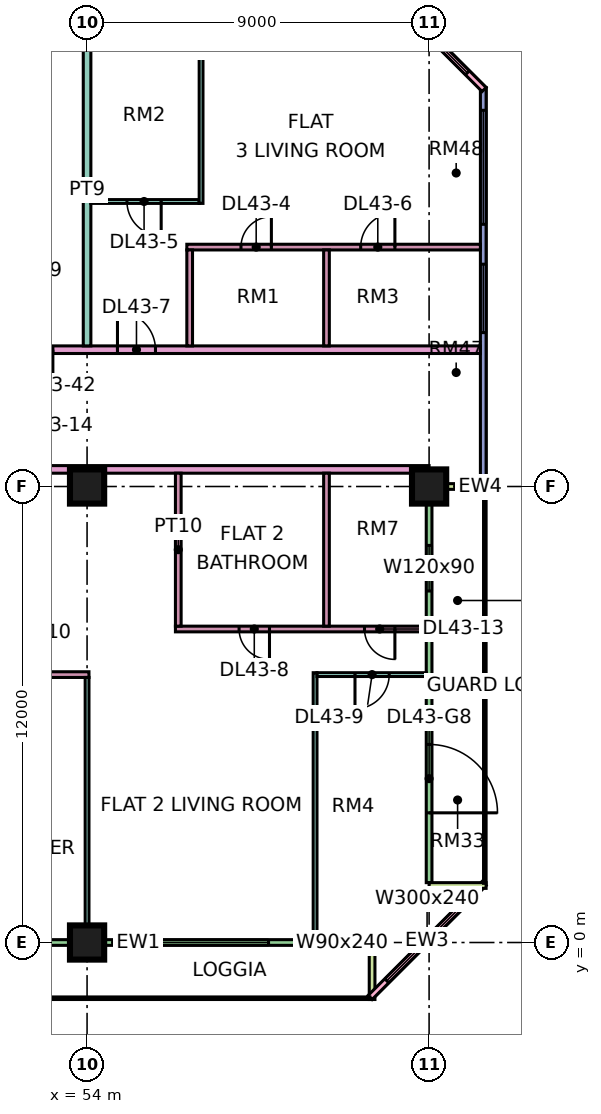
"""IFC4 building model, lengths in metres.
Left out: names, types, materials, properties, quantities, classifications, styles, units other than length and angle.
Written with IfcOpenShell. Run it as: python <this file> out.ifc"""

import sys

from ifc_helpers import new_model, si_unit, direction, frame, frame_2d, origin, origin_2d, place, context, subcontext, project, spatial, rectangle, extrude, element, fill, save


model = new_model("IFC4")
c1 = context("Model", 3, precision=1e-05, world=origin(), true_north=direction((0.0, 1.0)))
c2 = subcontext(c1, "Body", "Model", "MODEL_VIEW")
j1 = project(units=[si_unit("LENGTHUNIT", "METRE"), si_unit("PLANEANGLEUNIT", "RADIAN")], contexts=[c1])
p1 = place(None, origin())
s1 = spatial("IfcSite", under=j1, at=p1, CompositionType="ELEMENT")
p2 = place(p1, origin())
s2 = spatial("IfcBuilding", under=s1, at=p2, CompositionType="ELEMENT")
p3 = place(p2, frame((0.0, 0.0, 187.4)))
s3 = spatial("IfcBuildingStorey", under=s2, at=p3, CompositionType="ELEMENT", Elevation=187.4)
for number, where, z_axis, x_axis in (
    (1, (54.0, 0.0, 0.0), (0.0, 0.0, 1.0), (1.0, 0.0, 0.0)),
    (2, (54.0, 12.0, 0.0), (0.0, 0.0, 1.0), (1.0, 0.0, 0.0)),
    (3, (63.0, 12.0, 0.0), (0.0, 0.0, 1.0), (1.0, 0.0, 0.0)),
):
    element("IfcColumn", number, at=place(p3, frame(where, z_axis=z_axis, x_axis=x_axis)), inside=s3, PredefinedType="COLUMN", context=c2, shape_type="SweptSolid", body=[
        extrude(rectangle(XDim=0.9, YDim=0.9, at=origin_2d()), origin(), (0.0, 0.0, 1.0), 3.75),
    ])
p4 = place(p3, frame((48.075, 0.0, 0.0), z_axis=(0.0, 0.0, 1.0), x_axis=(1.0, 0.0, 0.0)))
e4 = element("IfcWall", 4, at=p4, inside=s3, PredefinedType="SOLIDWALL", context=c2, shape_type="SweptSolid", body=[
    extrude(rectangle(XDim=13.35, YDim=0.15, at=frame_2d((6.675, 0.0))), origin(), (0.0, 0.0, 1.0), 3.35),
])
p5 = place(p4, frame((1.788, 0.0, 0.0)))
e5 = element("IfcOpeningElement", 5, at=p5, cuts=e4, PredefinedType="OPENING", context=c2, shape_type="SweptSolid", body=[
    extrude(rectangle(XDim=1.8, YDim=2.4, at=frame_2d((0.9, 1.2))), frame((0.0, 0.085, 0.0), z_axis=(0.0, -1.0, 0.0), x_axis=(1.0, 0.0, 0.0)), (0.0, 0.0, 1.0), 0.17),
])
p6 = place(p4, frame((7.7, 0.0, 0.45)))
e6 = element("IfcOpeningElement", 6, at=p6, cuts=e4, PredefinedType="OPENING", context=c2, shape_type="SweptSolid", body=[
    extrude(rectangle(XDim=3.0, YDim=2.4, at=frame_2d((1.5, 1.2))), frame((0.0, 0.085, 0.0), z_axis=(0.0, -1.0, 0.0), x_axis=(1.0, 0.0, 0.0)), (0.0, 0.0, 1.0), 0.17),
])
p7 = place(p4, frame((12.188, 0.0, 0.45)))
e7 = element("IfcOpeningElement", 7, at=p7, cuts=e4, PredefinedType="OPENING", context=c2, shape_type="SweptSolid", body=[
    extrude(rectangle(XDim=0.9, YDim=2.4, at=frame_2d((0.45, 1.2))), frame((0.0, 0.085, 0.0), z_axis=(0.0, -1.0, 0.0), x_axis=(1.0, 0.0, 0.0)), (0.0, 0.0, 1.0), 0.17),
])
p8 = place(p3, frame((61.5, -1.5, 0.0), z_axis=(0.0, 0.0, 1.0), x_axis=(0.0, 1.0, 0.0)))
e8 = element("IfcWall", 8, at=p8, inside=s3, PredefinedType="SOLIDWALL", context=c2, shape_type="SweptSolid", body=[
    extrude(rectangle(XDim=1.5, YDim=0.15, at=frame_2d((0.75, 0.0))), origin(), (0.0, 0.0, 1.0), 3.35),
])
p9 = place(p3, frame((61.447, -1.447, 0.0), z_axis=(0.0, 0.0, 1.0), x_axis=(0.707106781187, 0.707106781187, 0.0)))
e9 = element("IfcWall", 9, at=p9, inside=s3, PredefinedType="SOLIDWALL", context=c2, shape_type="SweptSolid", body=[
    extrude(rectangle(XDim=4.243, YDim=0.15, at=frame_2d((2.121, 0.0))), origin(), (0.0, 0.0, 1.0), 3.35),
])
p10 = place(p9, frame((0.621, 0.0, 0.45)))
e10 = element("IfcOpeningElement", 10, at=p10, cuts=e9, PredefinedType="OPENING", context=c2, shape_type="SweptSolid", body=[
    extrude(rectangle(XDim=3.0, YDim=2.4, at=frame_2d((1.5, 1.2))), frame((0.0, 0.085, 0.0), z_axis=(0.0, -1.0, 0.0), x_axis=(1.0, 0.0, 0.0)), (0.0, 0.0, 1.0), 0.17),
])
p11 = place(p3, frame((63.0, 1.575, 0.0), z_axis=(0.0, 0.0, 1.0), x_axis=(0.0, 1.0, 0.0)))
e11 = element("IfcWall", 11, at=p11, inside=s3, PredefinedType="SOLIDWALL", context=c2, shape_type="SweptSolid", body=[
    extrude(rectangle(XDim=10.35, YDim=0.15, at=frame_2d((5.175, 0.0))), origin(), (0.0, 0.0, 1.0), 3.35),
])
p12 = place(p11, frame((1.837, 0.0, 0.0)))
e12 = element("IfcOpeningElement", 12, at=p12, cuts=e11, PredefinedType="OPENING", context=c2, shape_type="SweptSolid", body=[
    extrude(rectangle(XDim=1.8, YDim=2.4, at=frame_2d((0.9, 1.2))), frame((0.0, 0.085, 0.0), z_axis=(0.0, -1.0, 0.0), x_axis=(1.0, 0.0, 0.0)), (0.0, 0.0, 1.0), 0.17),
])
p13 = place(p11, frame((7.675, 0.0, 1.7)))
e13 = element("IfcOpeningElement", 13, at=p13, cuts=e11, PredefinedType="OPENING", context=c2, shape_type="SweptSolid", body=[
    extrude(rectangle(XDim=1.2, YDim=0.9, at=frame_2d((0.6, 0.45))), frame((0.0, 0.085, 0.0), z_axis=(0.0, -1.0, 0.0), x_axis=(1.0, 0.0, 0.0)), (0.0, 0.0, 1.0), 0.17),
])
for number, where, z_axis, x_axis in (
    (14, (64.5, 1.5, 0.0), (0.0, 0.0, 1.0), (-1.0, 0.0, 0.0)),
    (15, (64.5, 12.0, 0.0), (0.0, 0.0, 1.0), (-1.0, 0.0, 0.0)),
):
    element("IfcWall", number, at=place(p3, frame(where, z_axis=z_axis, x_axis=x_axis)), inside=s3, PredefinedType="SOLIDWALL", context=c2, shape_type="SweptSolid", body=[
        extrude(rectangle(XDim=1.5, YDim=0.15, at=frame_2d((0.75, 0.0))), origin(), (0.0, 0.0, 1.0), 3.35),
    ])
p14 = place(p3, frame((64.425, 12.075, 0.0), z_axis=(0.0, 0.0, 1.0), x_axis=(0.0, 1.0, 0.0)))
e16 = element("IfcWall", 16, at=p14, inside=s3, PredefinedType="SOLIDWALL", context=c2, shape_type="SweptSolid", body=[
    extrude(rectangle(XDim=10.425, YDim=0.15, at=frame_2d((5.212, 0.0))), origin(), (0.0, 0.0, 1.0), 3.35),
])
p15 = place(p14, frame((3.975, 0.0, 0.45)))
e17 = element("IfcOpeningElement", 17, at=p15, cuts=e16, PredefinedType="OPENING", context=c2, shape_type="SweptSolid", body=[
    extrude(rectangle(XDim=1.8, YDim=2.4, at=frame_2d((0.9, 1.2))), frame((0.0, 0.085, 0.0), z_axis=(0.0, -1.0, 0.0), x_axis=(1.0, 0.0, 0.0)), (0.0, 0.0, 1.0), 0.17),
])
p16 = place(p14, frame((6.825, 0.0, 0.45)))
e18 = element("IfcOpeningElement", 18, at=p16, cuts=e16, PredefinedType="OPENING", context=c2, shape_type="SweptSolid", body=[
    extrude(rectangle(XDim=3.0, YDim=2.4, at=frame_2d((1.5, 1.2))), frame((0.0, 0.085, 0.0), z_axis=(0.0, -1.0, 0.0), x_axis=(1.0, 0.0, 0.0)), (0.0, 0.0, 1.0), 0.17),
])
p17 = place(p3, frame((64.447, 22.447, 0.0), z_axis=(0.0, 0.0, 1.0), x_axis=(-0.707106781187, 0.707106781187, 0.0)))
e19 = element("IfcWall", 19, at=p17, inside=s3, PredefinedType="SOLIDWALL", context=c2, shape_type="SweptSolid", body=[
    extrude(rectangle(XDim=4.243, YDim=0.15, at=frame_2d((2.121, 0.0))), origin(), (0.0, 0.0, 1.0), 3.35),
])
p18 = place(p17, frame((0.621, 0.0, 0.45)))
e20 = element("IfcOpeningElement", 20, at=p18, cuts=e19, PredefinedType="OPENING", context=c2, shape_type="SweptSolid", body=[
    extrude(rectangle(XDim=3.0, YDim=2.4, at=frame_2d((1.5, 1.2))), frame((0.0, 0.085, 0.0), z_axis=(0.0, -1.0, 0.0), x_axis=(1.0, 0.0, 0.0)), (0.0, 0.0, 1.0), 0.17),
])
p19 = place(p3, frame((40.65, 12.45, 0.0), z_axis=(0.0, 0.0, 1.0), x_axis=(1.0, 0.0, 0.0)))
e21 = element("IfcWall", 21, at=p19, inside=s3, PredefinedType="PARTITIONING", context=c2, shape_type="SweptSolid", body=[
    extrude(rectangle(XDim=22.35, YDim=0.2, at=frame_2d((11.175, 0.0))), origin(), (0.0, 0.0, 1.0), 3.35),
])
p20 = place(p19, frame((10.8, 0.0, 0.0)))
e22 = element("IfcOpeningElement", 22, at=p20, cuts=e21, PredefinedType="OPENING", context=c2, shape_type="SweptSolid", body=[
    extrude(rectangle(XDim=1.0, YDim=2.1, at=frame_2d((0.5, 1.05))), frame((0.0, 0.11, 0.0), z_axis=(0.0, -1.0, 0.0), x_axis=(1.0, 0.0, 0.0)), (0.0, 0.0, 1.0), 0.22),
])
p21 = place(p19, frame((1.05, 0.0, 0.0)))
e23 = element("IfcOpeningElement", 23, at=p21, cuts=e21, PredefinedType="OPENING", context=c2, shape_type="SweptSolid", body=[
    extrude(rectangle(XDim=1.0, YDim=2.1, at=frame_2d((0.5, 1.05))), frame((0.0, 0.11, 0.0), z_axis=(0.0, -1.0, 0.0), x_axis=(1.0, 0.0, 0.0)), (0.0, 0.0, 1.0), 0.22),
])
p22 = place(p3, frame((48.1, 7.05, 0.0), z_axis=(0.0, 0.0, 1.0), x_axis=(1.0, 0.0, 0.0)))
e24 = element("IfcWall", 24, at=p22, inside=s3, PredefinedType="PARTITIONING", context=c2, shape_type="SweptSolid", body=[
    extrude(rectangle(XDim=5.95, YDim=0.15, at=frame_2d((2.975, 0.0))), origin(), (0.0, 0.0, 1.0), 3.35),
])
p23 = place(p22, frame((3.95, 0.0, 0.0)))
e25 = element("IfcOpeningElement", 25, at=p23, cuts=e24, PredefinedType="OPENING", context=c2, shape_type="SweptSolid", body=[
    extrude(rectangle(XDim=0.9, YDim=2.1, at=frame_2d((0.45, 1.05))), frame((0.0, 0.085, 0.0), z_axis=(0.0, -1.0, 0.0), x_axis=(1.0, 0.0, 0.0)), (0.0, 0.0, 1.0), 0.17),
])
p24 = place(p3, frame((51.225, 15.6, 0.0), z_axis=(0.0, 0.0, 1.0), x_axis=(1.0, 0.0, 0.0)))
e26 = element("IfcWall", 26, at=p24, inside=s3, PredefinedType="PARTITIONING", context=c2, shape_type="SweptSolid", body=[
    extrude(rectangle(XDim=13.125, YDim=0.2, at=frame_2d((6.562, 0.0))), origin(), (0.0, 0.0, 1.0), 3.35),
])
p25 = place(p24, frame((3.575, 0.0, 0.0)))
e27 = element("IfcOpeningElement", 27, at=p25, cuts=e26, PredefinedType="OPENING", context=c2, shape_type="SweptSolid", body=[
    extrude(rectangle(XDim=1.0, YDim=2.1, at=frame_2d((0.5, 1.05))), frame((0.0, 0.11, 0.0), z_axis=(0.0, -1.0, 0.0), x_axis=(1.0, 0.0, 0.0)), (0.0, 0.0, 1.0), 0.22),
])
p26 = place(p24, frame((0.875, 0.0, 0.0)))
e28 = element("IfcOpeningElement", 28, at=p26, cuts=e26, PredefinedType="OPENING", context=c2, shape_type="SweptSolid", body=[
    extrude(rectangle(XDim=1.0, YDim=2.1, at=frame_2d((0.5, 1.05))), frame((0.0, 0.11, 0.0), z_axis=(0.0, -1.0, 0.0), x_axis=(1.0, 0.0, 0.0)), (0.0, 0.0, 1.0), 0.22),
])
p27 = place(p3, frame((54.0, 0.074, 0.0), z_axis=(0.0, 0.0, 1.0), x_axis=(0.0, 1.0, 0.0)))
e29 = element("IfcWall", 29, at=p27, inside=s3, PredefinedType="PARTITIONING", context=c2, shape_type="SweptSolid", body=[
    extrude(rectangle(XDim=6.901, YDim=0.1, at=frame_2d((3.451, 0.0))), origin(), (0.0, 0.0, 1.0), 3.35),
])
p28 = place(p3, frame((54.0, 15.7, 0.0), z_axis=(0.0, 0.0, 1.0), x_axis=(0.0, 1.0, 0.0)))
e30 = element("IfcWall", 30, at=p28, inside=s3, PredefinedType="PARTITIONING", context=c2, shape_type="SweptSolid", body=[
    extrude(rectangle(XDim=8.226, YDim=0.2, at=frame_2d((4.113, 0.0))), origin(), (0.0, 0.0, 1.0), 3.35),
])
p29 = place(p3, frame((54.1, 19.5, 0.0), z_axis=(0.0, 0.0, 1.0), x_axis=(1.0, 0.0, 0.0)))
e31 = element("IfcWall", 31, at=p29, inside=s3, PredefinedType="PARTITIONING", context=c2, shape_type="SweptSolid", body=[
    extrude(rectangle(XDim=2.85, YDim=0.1, at=frame_2d((1.425, 0.0))), origin(), (0.0, 0.0, 1.0), 3.35),
])
p30 = place(p29, frame((0.95, 0.0, 0.0)))
e32 = element("IfcOpeningElement", 32, at=p30, cuts=e31, PredefinedType="OPENING", context=c2, shape_type="SweptSolid", body=[
    extrude(rectangle(XDim=0.9, YDim=2.1, at=frame_2d((0.45, 1.05))), frame((0.0, 0.06, 0.0), z_axis=(0.0, -1.0, 0.0), x_axis=(1.0, 0.0, 0.0)), (0.0, 0.0, 1.0), 0.12),
])
p31 = place(p3, frame((56.325, 8.25, 0.0), z_axis=(0.0, 0.0, 1.0), x_axis=(1.0, 0.0, 0.0)))
e33 = element("IfcWall", 33, at=p31, inside=s3, PredefinedType="PARTITIONING", context=c2, shape_type="SweptSolid", body=[
    extrude(rectangle(XDim=6.601, YDim=0.15, at=frame_2d((3.301, 0.0))), origin(), (0.0, 0.0, 1.0), 3.35),
])
p32 = place(p31, frame((1.675, 0.0, 0.0)))
e34 = element("IfcOpeningElement", 34, at=p32, cuts=e33, PredefinedType="OPENING", context=c2, shape_type="SweptSolid", body=[
    extrude(rectangle(XDim=0.8, YDim=2.1, at=frame_2d((0.4, 1.05))), frame((0.0, 0.085, 0.0), z_axis=(0.0, -1.0, 0.0), x_axis=(1.0, 0.0, 0.0)), (0.0, 0.0, 1.0), 0.17),
])
p33 = place(p31, frame((4.975, 0.0, 0.0)))
e35 = element("IfcOpeningElement", 35, at=p33, cuts=e33, PredefinedType="OPENING", context=c2, shape_type="SweptSolid", body=[
    extrude(rectangle(XDim=0.8, YDim=2.1, at=frame_2d((0.4, 1.05))), frame((0.0, 0.085, 0.0), z_axis=(0.0, -1.0, 0.0), x_axis=(1.0, 0.0, 0.0)), (0.0, 0.0, 1.0), 0.17),
])
p34 = place(p3, frame((56.4, 8.325, 0.0), z_axis=(0.0, 0.0, 1.0), x_axis=(0.0, 1.0, 0.0)))
e36 = element("IfcWall", 36, at=p34, inside=s3, PredefinedType="PARTITIONING", context=c2, shape_type="SweptSolid", body=[
    extrude(rectangle(XDim=4.025, YDim=0.15, at=frame_2d((2.013, 0.0))), origin(), (0.0, 0.0, 1.0), 3.35),
])
p35 = place(p3, frame((56.625, 18.3, 0.0), z_axis=(0.0, 0.0, 1.0), x_axis=(1.0, 0.0, 0.0)))
e37 = element("IfcWall", 37, at=p35, inside=s3, PredefinedType="PARTITIONING", context=c2, shape_type="SweptSolid", body=[
    extrude(rectangle(XDim=7.725, YDim=0.15, at=frame_2d((3.863, 0.0))), origin(), (0.0, 0.0, 1.0), 3.35),
])
p36 = place(p35, frame((1.425, 0.0, 0.0)))
e38 = element("IfcOpeningElement", 38, at=p36, cuts=e37, PredefinedType="OPENING", context=c2, shape_type="SweptSolid", body=[
    extrude(rectangle(XDim=0.8, YDim=2.1, at=frame_2d((0.4, 1.05))), frame((0.0, 0.085, 0.0), z_axis=(0.0, -1.0, 0.0), x_axis=(1.0, 0.0, 0.0)), (0.0, 0.0, 1.0), 0.17),
])
p37 = place(p35, frame((4.575, 0.0, 0.0)))
e39 = element("IfcOpeningElement", 39, at=p37, cuts=e37, PredefinedType="OPENING", context=c2, shape_type="SweptSolid", body=[
    extrude(rectangle(XDim=0.9, YDim=2.1, at=frame_2d((0.45, 1.05))), frame((0.0, 0.085, 0.0), z_axis=(0.0, -1.0, 0.0), x_axis=(1.0, 0.0, 0.0)), (0.0, 0.0, 1.0), 0.17),
])
p38 = place(p3, frame((56.7, 15.7, 0.0), z_axis=(0.0, 0.0, 1.0), x_axis=(0.0, 1.0, 0.0)))
e40 = element("IfcWall", 40, at=p38, inside=s3, PredefinedType="PARTITIONING", context=c2, shape_type="SweptSolid", body=[
    extrude(rectangle(XDim=2.525, YDim=0.15, at=frame_2d((1.263, 0.0))), origin(), (0.0, 0.0, 1.0), 3.35),
])
p39 = place(p3, frame((57.0, 19.45, 0.0), z_axis=(0.0, 0.0, 1.0), x_axis=(0.0, 1.0, 0.0)))
e41 = element("IfcWall", 41, at=p39, inside=s3, PredefinedType="PARTITIONING", context=c2, shape_type="SweptSolid", body=[
    extrude(rectangle(XDim=4.476, YDim=0.1, at=frame_2d((2.238, 0.0))), origin(), (0.0, 0.0, 1.0), 3.35),
])
p40 = place(p3, frame((60.0, 0.074, 0.0), z_axis=(0.0, 0.0, 1.0), x_axis=(0.0, 1.0, 0.0)))
e42 = element("IfcWall", 42, at=p40, inside=s3, PredefinedType="PARTITIONING", context=c2, shape_type="SweptSolid", body=[
    extrude(rectangle(XDim=7.026, YDim=0.1, at=frame_2d((3.513, 0.0))), origin(), (0.0, 0.0, 1.0), 3.35),
])
p41 = place(p3, frame((60.05, 7.05, 0.0), z_axis=(0.0, 0.0, 1.0), x_axis=(1.0, 0.0, 0.0)))
e43 = element("IfcWall", 43, at=p41, inside=s3, PredefinedType="PARTITIONING", context=c2, shape_type="SweptSolid", body=[
    extrude(rectangle(XDim=2.876, YDim=0.1, at=frame_2d((1.438, 0.0))), origin(), (0.0, 0.0, 1.0), 3.35),
])
p42 = place(p41, frame((1.0, 0.0, 0.0)))
e44 = element("IfcOpeningElement", 44, at=p42, cuts=e43, PredefinedType="OPENING", context=c2, shape_type="SweptSolid", body=[
    extrude(rectangle(XDim=0.9, YDim=2.1, at=frame_2d((0.45, 1.05))), frame((0.0, 0.06, 0.0), z_axis=(0.0, -1.0, 0.0), x_axis=(1.0, 0.0, 0.0)), (0.0, 0.0, 1.0), 0.12),
])
p43 = place(p3, frame((60.3, 8.325, 0.0), z_axis=(0.0, 0.0, 1.0), x_axis=(0.0, 1.0, 0.0)))
e45 = element("IfcWall", 45, at=p43, inside=s3, PredefinedType="PARTITIONING", context=c2, shape_type="SweptSolid", body=[
    extrude(rectangle(XDim=4.025, YDim=0.15, at=frame_2d((2.013, 0.0))), origin(), (0.0, 0.0, 1.0), 3.35),
])
p44 = place(p3, frame((60.3, 15.7, 0.0), z_axis=(0.0, 0.0, 1.0), x_axis=(0.0, 1.0, 0.0)))
e46 = element("IfcWall", 46, at=p44, inside=s3, PredefinedType="PARTITIONING", context=c2, shape_type="SweptSolid", body=[
    extrude(rectangle(XDim=2.525, YDim=0.15, at=frame_2d((1.263, 0.0))), origin(), (0.0, 0.0, 1.0), 3.35),
])
p45 = place(p6, origin())
e47 = element("IfcWindow", 47, at=p45, inside=s3, PartitioningType="SINGLE_PANEL", PredefinedType="WINDOW", context=c2, shape_type="SweptSolid", body=[
    extrude(rectangle(XDim=3.0, YDim=2.4, at=frame_2d((1.5, 1.2))), frame((0.0, 0.03, 0.0), z_axis=(0.0, -1.0, 0.0), x_axis=(1.0, 0.0, 0.0)), (0.0, 0.0, 1.0), 0.06),
])
fill(e6, e47)
p46 = place(p7, origin())
e48 = element("IfcWindow", 48, at=p46, inside=s3, PartitioningType="SINGLE_PANEL", PredefinedType="WINDOW", context=c2, shape_type="SweptSolid", body=[
    extrude(rectangle(XDim=0.9, YDim=2.4, at=frame_2d((0.45, 1.2))), frame((0.0, 0.03, 0.0), z_axis=(0.0, -1.0, 0.0), x_axis=(1.0, 0.0, 0.0)), (0.0, 0.0, 1.0), 0.06),
])
fill(e7, e48)
p47 = place(p10, origin())
e49 = element("IfcWindow", 49, at=p47, inside=s3, PartitioningType="SINGLE_PANEL", PredefinedType="WINDOW", context=c2, shape_type="SweptSolid", body=[
    extrude(rectangle(XDim=3.0, YDim=2.4, at=frame_2d((1.5, 1.2))), frame((0.0, 0.03, 0.0), z_axis=(0.0, -1.0, 0.0), x_axis=(1.0, 0.0, 0.0)), (0.0, 0.0, 1.0), 0.06),
])
fill(e10, e49)
p48 = place(p12, frame((1.8, 0.0, 0.0), z_axis=(0.0, 0.0, 1.0), x_axis=(-1.0, 0.0, 0.0)))
e50 = element("IfcDoor", 50, at=p48, inside=s3, OperationType="DOUBLE_DOOR_SINGLE_SWING", PredefinedType="DOOR", context=c2, shape_type="SweptSolid", body=[
    extrude(rectangle(XDim=1.8, YDim=2.4, at=frame_2d((0.9, 1.2))), frame((0.0, 0.025, 0.0), z_axis=(0.0, -1.0, 0.0), x_axis=(1.0, 0.0, 0.0)), (0.0, 0.0, 1.0), 0.05),
])
fill(e12, e50)
p49 = place(p13, origin())
e51 = element("IfcWindow", 51, at=p49, inside=s3, PartitioningType="SINGLE_PANEL", PredefinedType="WINDOW", context=c2, shape_type="SweptSolid", body=[
    extrude(rectangle(XDim=1.2, YDim=0.9, at=frame_2d((0.6, 0.45))), frame((0.0, 0.03, 0.0), z_axis=(0.0, -1.0, 0.0), x_axis=(1.0, 0.0, 0.0)), (0.0, 0.0, 1.0), 0.06),
])
fill(e13, e51)
p50 = place(p15, origin())
e52 = element("IfcWindow", 52, at=p50, inside=s3, PartitioningType="SINGLE_PANEL", PredefinedType="WINDOW", context=c2, shape_type="SweptSolid", body=[
    extrude(rectangle(XDim=1.8, YDim=2.4, at=frame_2d((0.9, 1.2))), frame((0.0, 0.03, 0.0), z_axis=(0.0, -1.0, 0.0), x_axis=(1.0, 0.0, 0.0)), (0.0, 0.0, 1.0), 0.06),
])
fill(e17, e52)
p51 = place(p16, origin())
e53 = element("IfcWindow", 53, at=p51, inside=s3, PartitioningType="SINGLE_PANEL", PredefinedType="WINDOW", context=c2, shape_type="SweptSolid", body=[
    extrude(rectangle(XDim=3.0, YDim=2.4, at=frame_2d((1.5, 1.2))), frame((0.0, 0.03, 0.0), z_axis=(0.0, -1.0, 0.0), x_axis=(1.0, 0.0, 0.0)), (0.0, 0.0, 1.0), 0.06),
])
fill(e18, e53)
p52 = place(p18, origin())
e54 = element("IfcWindow", 54, at=p52, inside=s3, PartitioningType="SINGLE_PANEL", PredefinedType="WINDOW", context=c2, shape_type="SweptSolid", body=[
    extrude(rectangle(XDim=3.0, YDim=2.4, at=frame_2d((1.5, 1.2))), frame((0.0, 0.03, 0.0), z_axis=(0.0, -1.0, 0.0), x_axis=(1.0, 0.0, 0.0)), (0.0, 0.0, 1.0), 0.06),
])
fill(e20, e54)
p53 = place(p36, frame((0.8, 0.0, 0.0), z_axis=(0.0, 0.0, 1.0), x_axis=(-1.0, 0.0, 0.0)))
e55 = element("IfcDoor", 55, at=p53, inside=s3, OperationType="SINGLE_SWING_RIGHT", PredefinedType="DOOR", context=c2, shape_type="SweptSolid", body=[
    extrude(rectangle(XDim=0.8, YDim=2.1, at=frame_2d((0.4, 1.05))), frame((0.0, 0.025, 0.0), z_axis=(0.0, -1.0, 0.0), x_axis=(1.0, 0.0, 0.0)), (0.0, 0.0, 1.0), 0.05),
])
fill(e38, e55)
p54 = place(p30, origin())
e56 = element("IfcDoor", 56, at=p54, inside=s3, OperationType="SINGLE_SWING_RIGHT", PredefinedType="DOOR", context=c2, shape_type="SweptSolid", body=[
    extrude(rectangle(XDim=0.9, YDim=2.1, at=frame_2d((0.45, 1.05))), frame((0.0, 0.025, 0.0), z_axis=(0.0, -1.0, 0.0), x_axis=(1.0, 0.0, 0.0)), (0.0, 0.0, 1.0), 0.05),
])
fill(e32, e56)
p55 = place(p37, frame((0.9, 0.0, 0.0), z_axis=(0.0, 0.0, 1.0), x_axis=(-1.0, 0.0, 0.0)))
e57 = element("IfcDoor", 57, at=p55, inside=s3, OperationType="SINGLE_SWING_RIGHT", PredefinedType="DOOR", context=c2, shape_type="SweptSolid", body=[
    extrude(rectangle(XDim=0.9, YDim=2.1, at=frame_2d((0.45, 1.05))), frame((0.0, 0.025, 0.0), z_axis=(0.0, -1.0, 0.0), x_axis=(1.0, 0.0, 0.0)), (0.0, 0.0, 1.0), 0.05),
])
fill(e39, e57)
p56 = place(p25, origin())
e58 = element("IfcDoor", 58, at=p56, inside=s3, OperationType="SINGLE_SWING_LEFT", PredefinedType="DOOR", context=c2, shape_type="SweptSolid", body=[
    extrude(rectangle(XDim=1.0, YDim=2.1, at=frame_2d((0.5, 1.05))), frame((0.0, 0.025, 0.0), z_axis=(0.0, -1.0, 0.0), x_axis=(1.0, 0.0, 0.0)), (0.0, 0.0, 1.0), 0.05),
])
fill(e27, e58)
p57 = place(p32, origin())
e59 = element("IfcDoor", 59, at=p57, inside=s3, OperationType="SINGLE_SWING_RIGHT", PredefinedType="DOOR", context=c2, shape_type="SweptSolid", body=[
    extrude(rectangle(XDim=0.8, YDim=2.1, at=frame_2d((0.4, 1.05))), frame((0.0, 0.025, 0.0), z_axis=(0.0, -1.0, 0.0), x_axis=(1.0, 0.0, 0.0)), (0.0, 0.0, 1.0), 0.05),
])
fill(e34, e59)
p58 = place(p42, frame((0.9, 0.0, 0.0), z_axis=(0.0, 0.0, 1.0), x_axis=(-1.0, 0.0, 0.0)))
e60 = element("IfcDoor", 60, at=p58, inside=s3, OperationType="SINGLE_SWING_LEFT", PredefinedType="DOOR", context=c2, shape_type="SweptSolid", body=[
    extrude(rectangle(XDim=0.9, YDim=2.1, at=frame_2d((0.45, 1.05))), frame((0.0, 0.025, 0.0), z_axis=(0.0, -1.0, 0.0), x_axis=(1.0, 0.0, 0.0)), (0.0, 0.0, 1.0), 0.05),
])
fill(e44, e60)
p59 = place(p33, origin())
e61 = element("IfcDoor", 61, at=p59, inside=s3, OperationType="SINGLE_SWING_RIGHT", PredefinedType="DOOR", context=c2, shape_type="SweptSolid", body=[
    extrude(rectangle(XDim=0.8, YDim=2.1, at=frame_2d((0.4, 1.05))), frame((0.0, 0.025, 0.0), z_axis=(0.0, -1.0, 0.0), x_axis=(1.0, 0.0, 0.0)), (0.0, 0.0, 1.0), 0.05),
])
fill(e35, e61)
p60 = place(p26, origin())
e62 = element("IfcDoor", 62, at=p60, inside=s3, OperationType="SINGLE_SWING_RIGHT", PredefinedType="DOOR", context=c2, shape_type="SweptSolid", body=[
    extrude(rectangle(XDim=1.0, YDim=2.1, at=frame_2d((0.5, 1.05))), frame((0.0, 0.025, 0.0), z_axis=(0.0, -1.0, 0.0), x_axis=(1.0, 0.0, 0.0)), (0.0, 0.0, 1.0), 0.05),
])
fill(e28, e62)
save(model, sys.argv[1])
